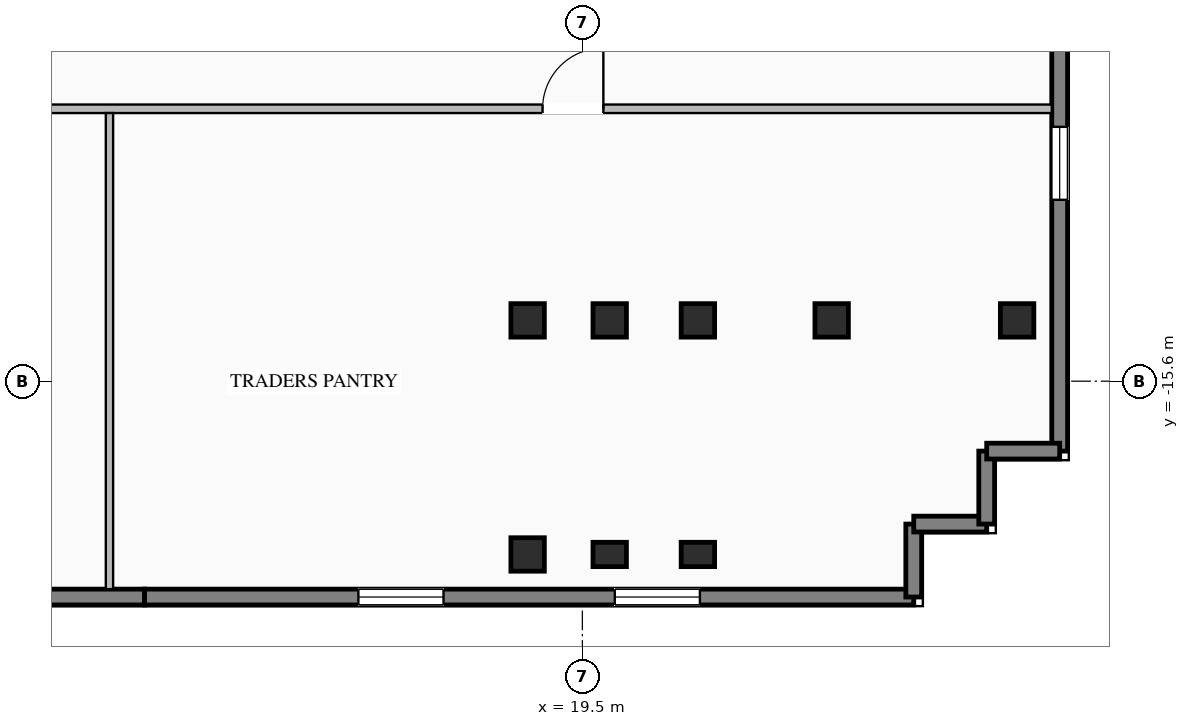
"""IFC4 building model, lengths in metres.
Left out: names, types, materials, properties, quantities, classifications, styles, units other than length and angle.
Written with IfcOpenShell. Run it as: python <this file> out.ifc"""

import sys

from ifc_helpers import new_model, si_unit, direction, frame, frame_2d, origin, origin_2d, place, context, subcontext, project, spatial, rectangle, i_section, extrude, element, fill, save


model = new_model("IFC4")
c1 = context("Model", 3, precision=1e-05, world=origin(), true_north=direction((0.0, 1.0)))
c2 = subcontext(c1, "Body", "Model", "MODEL_VIEW")
j1 = project(units=[si_unit("LENGTHUNIT", "METRE"), si_unit("PLANEANGLEUNIT", "RADIAN")], contexts=[c1])
p1 = place(None, origin())
s1 = spatial("IfcSite", under=j1, at=p1, CompositionType="ELEMENT")
p2 = place(p1, origin())
s2 = spatial("IfcBuilding", under=s1, at=p2, CompositionType="ELEMENT")
p3 = place(p2, frame((0.0, 0.0, 208.5)))
s3 = spatial("IfcBuildingStorey", under=s2, at=p3, CompositionType="ELEMENT", Elevation=208.5)
for number, where, z_axis, x_axis in (
    (1, (18.6, -14.6, 0.0), (0.0, 0.0, 1.0), (1.0, 0.0, 0.0)),
    (2, (19.95, -14.6, 0.0), (0.0, 0.0, 1.0), (1.0, 0.0, 0.0)),
    (3, (21.4, -14.6, 0.0), (0.0, 0.0, 1.0), (1.0, 0.0, 0.0)),
    (4, (23.6, -14.6, 0.0), (0.0, 0.0, 1.0), (1.0, 0.0, 0.0)),
    (5, (18.6, -18.45, 0.0), (0.0, 0.0, 1.0), (1.0, 0.0, 0.0)),
    (6, (26.65, -14.6, 0.0), (0.0, 0.0, 1.0), (1.0, 0.0, 0.0)),
):
    element("IfcColumn", number, at=place(p3, frame(where, z_axis=z_axis, x_axis=x_axis)), inside=s3, PredefinedType="COLUMN", context=c2, shape_type="SweptSolid", body=[
        extrude(i_section(OverallWidth=0.55, OverallDepth=0.55, WebThickness=0.024, FlangeThickness=0.036, at=origin_2d()), origin(), (0.0, 0.0, 1.0), 3.45),
    ])
for number, where, z_axis, x_axis in (
    (7, (19.95, -18.45, 0.0), (0.0, 0.0, 1.0), (1.0, 0.0, 0.0)),
    (8, (21.4, -18.45, 0.0), (0.0, 0.0, 1.0), (1.0, 0.0, 0.0)),
):
    element("IfcColumn", number, at=place(p3, frame(where, z_axis=z_axis, x_axis=x_axis)), inside=s3, PredefinedType="PILASTER", context=c2, shape_type="SweptSolid", body=[
        extrude(rectangle(XDim=0.55, YDim=0.4, at=origin_2d()), origin(), (0.0, 0.0, 1.0), 3.45),
    ])
p4 = place(p3, frame((12.3, -19.15, 0.0), z_axis=(0.0, 0.0, 1.0), x_axis=(-1.0, 0.0, 0.0)))
e9 = element("IfcWall", 9, at=p4, inside=s3, PredefinedType="STANDARD", context=c2, shape_type="SweptSolid", body=[
    extrude(rectangle(XDim=9.0, YDim=0.26, at=frame_2d((4.5, 0.0))), origin(), (0.0, 0.0, 1.0), 3.25),
])
p5 = place(p4, frame((2.3, 0.0, 0.76)))
e10 = element("IfcOpeningElement", 10, at=p5, cuts=e9, PredefinedType="OPENING", context=c2, shape_type="SweptSolid", body=[
    extrude(rectangle(XDim=1.4, YDim=1.95, at=frame_2d((0.7, 0.975))), frame((0.0, 0.14, 0.0), z_axis=(0.0, -1.0, 0.0), x_axis=(1.0, 0.0, 0.0)), (0.0, 0.0, 1.0), 0.28),
])
p6 = place(p4, frame((5.3, 0.0, 0.76)))
e11 = element("IfcOpeningElement", 11, at=p6, cuts=e9, PredefinedType="OPENING", context=c2, shape_type="SweptSolid", body=[
    extrude(rectangle(XDim=1.4, YDim=1.95, at=frame_2d((0.7, 0.975))), frame((0.0, 0.14, 0.0), z_axis=(0.0, -1.0, 0.0), x_axis=(1.0, 0.0, 0.0)), (0.0, 0.0, 1.0), 0.28),
])
p7 = place(p3, frame((24.95, -19.15, 0.0), z_axis=(0.0, 0.0, 1.0), x_axis=(-1.0, 0.0, 0.0)))
e12 = element("IfcWall", 12, at=p7, inside=s3, PredefinedType="STANDARD", context=c2, shape_type="SweptSolid", body=[
    extrude(rectangle(XDim=12.65, YDim=0.26, at=frame_2d((6.325, 0.0))), origin(), (0.0, 0.0, 1.0), 3.25),
])
p8 = place(p7, frame((3.517, 0.0, 0.76)))
e13 = element("IfcOpeningElement", 13, at=p8, cuts=e12, PredefinedType="OPENING", context=c2, shape_type="SweptSolid", body=[
    extrude(rectangle(XDim=1.4, YDim=1.95, at=frame_2d((0.7, 0.975))), frame((0.0, 0.14, 0.0), z_axis=(0.0, -1.0, 0.0), x_axis=(1.0, 0.0, 0.0)), (0.0, 0.0, 1.0), 0.28),
])
p9 = place(p7, frame((7.733, 0.0, 0.76)))
e14 = element("IfcOpeningElement", 14, at=p9, cuts=e12, PredefinedType="OPENING", context=c2, shape_type="SweptSolid", body=[
    extrude(rectangle(XDim=1.4, YDim=1.95, at=frame_2d((0.7, 0.975))), frame((0.0, 0.14, 0.0), z_axis=(0.0, -1.0, 0.0), x_axis=(1.0, 0.0, 0.0)), (0.0, 0.0, 1.0), 0.28),
])
p10 = place(p3, frame((27.35, -0.9, 0.0), z_axis=(0.0, 0.0, 1.0), x_axis=(0.0, -1.0, 0.0)))
e15 = element("IfcWall", 15, at=p10, inside=s3, PredefinedType="STANDARD", context=c2, shape_type="SweptSolid", body=[
    extrude(rectangle(XDim=15.85, YDim=0.26, at=frame_2d((7.925, 0.0))), origin(), (0.0, 0.0, 1.0), 3.25),
])
p11 = place(p10, frame((4.683, 0.0, 0.76)))
e16 = element("IfcOpeningElement", 16, at=p11, cuts=e15, PredefinedType="OPENING", context=c2, shape_type="SweptSolid", body=[
    extrude(rectangle(XDim=1.2, YDim=1.95, at=frame_2d((0.6, 0.975))), frame((0.0, 0.14, 0.0), z_axis=(0.0, -1.0, 0.0), x_axis=(1.0, 0.0, 0.0)), (0.0, 0.0, 1.0), 0.28),
])
p12 = place(p10, frame((10.517, 0.0, 0.76)))
e17 = element("IfcOpeningElement", 17, at=p12, cuts=e15, PredefinedType="OPENING", context=c2, shape_type="SweptSolid", body=[
    extrude(rectangle(XDim=1.2, YDim=1.95, at=frame_2d((0.6, 0.975))), frame((0.0, 0.14, 0.0), z_axis=(0.0, -1.0, 0.0), x_axis=(1.0, 0.0, 0.0)), (0.0, 0.0, 1.0), 0.28),
])
for number, where, z_axis, x_axis in (
    (18, (24.95, -19.15, 0.0), (0.0, 0.0, 1.0), (0.0, 1.0, 0.0)),
    (19, (24.95, -17.95, 0.0), (0.0, 0.0, 1.0), (1.0, 0.0, 0.0)),
    (20, (26.15, -17.95, 0.0), (0.0, 0.0, 1.0), (0.0, 1.0, 0.0)),
):
    element("IfcWall", number, at=place(p3, frame(where, z_axis=z_axis, x_axis=x_axis)), inside=s3, PredefinedType="STANDARD", context=c2, shape_type="SweptSolid", body=[
        extrude(rectangle(XDim=1.2, YDim=0.26, at=frame_2d((0.6, 0.0))), origin(), (0.0, 0.0, 1.0), 3.25),
    ])
p13 = place(p3, frame((26.15, -16.75, 0.0), z_axis=(0.0, 0.0, 1.0), x_axis=(1.0, 0.0, 0.0)))
e21 = element("IfcWall", 21, at=p13, inside=s3, PredefinedType="STANDARD", context=c2, shape_type="SweptSolid", body=[
    extrude(rectangle(XDim=1.2, YDim=0.26, at=frame_2d((0.6, 0.0))), origin(), (0.0, 0.0, 1.0), 3.25),
])
p14 = place(p3, frame((-29.62, -11.12, 0.0), z_axis=(0.0, 0.0, 1.0), x_axis=(1.0, 0.0, 0.0)))
e22 = element("IfcWall", 22, at=p14, inside=s3, PredefinedType="STANDARD", context=c2, shape_type="SweptSolid", body=[
    extrude(rectangle(XDim=56.84, YDim=0.14, at=frame_2d((28.42, 0.0))), origin(), (0.0, 0.0, 1.0), 3.25),
])
p15 = place(p14, frame((16.71, 0.0, 0.0)))
e23 = element("IfcOpeningElement", 23, at=p15, cuts=e22, PredefinedType="OPENING", context=c2, shape_type="SweptSolid", body=[
    extrude(rectangle(XDim=0.92, YDim=2.08, at=frame_2d((0.46, 1.04))), frame((0.0, 0.08, 0.0), z_axis=(0.0, -1.0, 0.0), x_axis=(1.0, 0.0, 0.0)), (0.0, 0.0, 1.0), 0.16),
])
p16 = place(p14, frame((20.21, 0.0, 0.0)))
e24 = element("IfcOpeningElement", 24, at=p16, cuts=e22, PredefinedType="OPENING", context=c2, shape_type="SweptSolid", body=[
    extrude(rectangle(XDim=0.92, YDim=2.08, at=frame_2d((0.46, 1.04))), frame((0.0, 0.08, 0.0), z_axis=(0.0, -1.0, 0.0), x_axis=(1.0, 0.0, 0.0)), (0.0, 0.0, 1.0), 0.16),
])
p17 = place(p14, frame((23.06, 0.0, 0.0)))
e25 = element("IfcOpeningElement", 25, at=p17, cuts=e22, PredefinedType="OPENING", context=c2, shape_type="SweptSolid", body=[
    extrude(rectangle(XDim=0.92, YDim=2.08, at=frame_2d((0.46, 1.04))), frame((0.0, 0.08, 0.0), z_axis=(0.0, -1.0, 0.0), x_axis=(1.0, 0.0, 0.0)), (0.0, 0.0, 1.0), 0.16),
])
p18 = place(p14, frame((3.649, 0.0, 0.0)))
e26 = element("IfcOpeningElement", 26, at=p18, cuts=e22, PredefinedType="OPENING", context=c2, shape_type="SweptSolid", body=[
    extrude(rectangle(XDim=1.0, YDim=2.08, at=frame_2d((0.5, 1.04))), frame((0.0, 0.08, 0.0), z_axis=(0.0, -1.0, 0.0), x_axis=(1.0, 0.0, 0.0)), (0.0, 0.0, 1.0), 0.16),
])
p19 = place(p14, frame((11.233, 0.0, 0.0)))
e27 = element("IfcOpeningElement", 27, at=p19, cuts=e22, PredefinedType="OPENING", context=c2, shape_type="SweptSolid", body=[
    extrude(rectangle(XDim=1.0, YDim=2.08, at=frame_2d((0.5, 1.04))), frame((0.0, 0.08, 0.0), z_axis=(0.0, -1.0, 0.0), x_axis=(1.0, 0.0, 0.0)), (0.0, 0.0, 1.0), 0.16),
])
p20 = place(p14, frame((32.481, 0.0, 0.0)))
e28 = element("IfcOpeningElement", 28, at=p20, cuts=e22, PredefinedType="OPENING", context=c2, shape_type="SweptSolid", body=[
    extrude(rectangle(XDim=1.0, YDim=2.08, at=frame_2d((0.5, 1.04))), frame((0.0, 0.08, 0.0), z_axis=(0.0, -1.0, 0.0), x_axis=(1.0, 0.0, 0.0)), (0.0, 0.0, 1.0), 0.16),
])
p21 = place(p14, frame((48.466, 0.0, 0.0)))
e29 = element("IfcOpeningElement", 29, at=p21, cuts=e22, PredefinedType="OPENING", context=c2, shape_type="SweptSolid", body=[
    extrude(rectangle(XDim=1.0, YDim=2.08, at=frame_2d((0.5, 1.04))), frame((0.0, 0.08, 0.0), z_axis=(0.0, -1.0, 0.0), x_axis=(1.0, 0.0, 0.0)), (0.0, 0.0, 1.0), 0.16),
])
p22 = place(p3, frame((11.723, -19.02, 0.0), z_axis=(0.0, 0.0, 1.0), x_axis=(0.0, 1.0, 0.0)))
e30 = element("IfcWall", 30, at=p22, inside=s3, PredefinedType="STANDARD", context=c2, shape_type="SweptSolid", body=[
    extrude(rectangle(XDim=7.83, YDim=0.12, at=frame_2d((3.915, 0.0))), origin(), (0.0, 0.0, 1.0), 3.25),
])
p23 = place(p8, origin())
e31 = element("IfcWindow", 31, at=p23, inside=s3, PartitioningType="SINGLE_PANEL", PredefinedType="WINDOW", context=c2, shape_type="SweptSolid", body=[
    extrude(rectangle(XDim=1.4, YDim=1.95, at=frame_2d((0.7, 0.975))), frame((0.0, 0.03, 0.0), z_axis=(0.0, -1.0, 0.0), x_axis=(1.0, 0.0, 0.0)), (0.0, 0.0, 1.0), 0.06),
])
fill(e13, e31)
p24 = place(p9, origin())
e32 = element("IfcWindow", 32, at=p24, inside=s3, PartitioningType="SINGLE_PANEL", PredefinedType="WINDOW", context=c2, shape_type="SweptSolid", body=[
    extrude(rectangle(XDim=1.4, YDim=1.95, at=frame_2d((0.7, 0.975))), frame((0.0, 0.03, 0.0), z_axis=(0.0, -1.0, 0.0), x_axis=(1.0, 0.0, 0.0)), (0.0, 0.0, 1.0), 0.06),
])
fill(e14, e32)
p25 = place(p12, origin())
e33 = element("IfcWindow", 33, at=p25, inside=s3, PartitioningType="SINGLE_PANEL", PredefinedType="WINDOW", context=c2, shape_type="SweptSolid", body=[
    extrude(rectangle(XDim=1.2, YDim=1.95, at=frame_2d((0.6, 0.975))), frame((0.0, 0.03, 0.0), z_axis=(0.0, -1.0, 0.0), x_axis=(1.0, 0.0, 0.0)), (0.0, 0.0, 1.0), 0.06),
])
fill(e17, e33)
p26 = place(p21, origin())
e34 = element("IfcDoor", 34, at=p26, inside=s3, OperationType="SINGLE_SWING_RIGHT", PredefinedType="DOOR", context=c2, shape_type="SweptSolid", body=[
    extrude(rectangle(XDim=1.0, YDim=2.08, at=frame_2d((0.5, 1.04))), frame((0.0, 0.025, 0.0), z_axis=(0.0, -1.0, 0.0), x_axis=(1.0, 0.0, 0.0)), (0.0, 0.0, 1.0), 0.05),
])
fill(e29, e34)
save(model, sys.argv[1])
